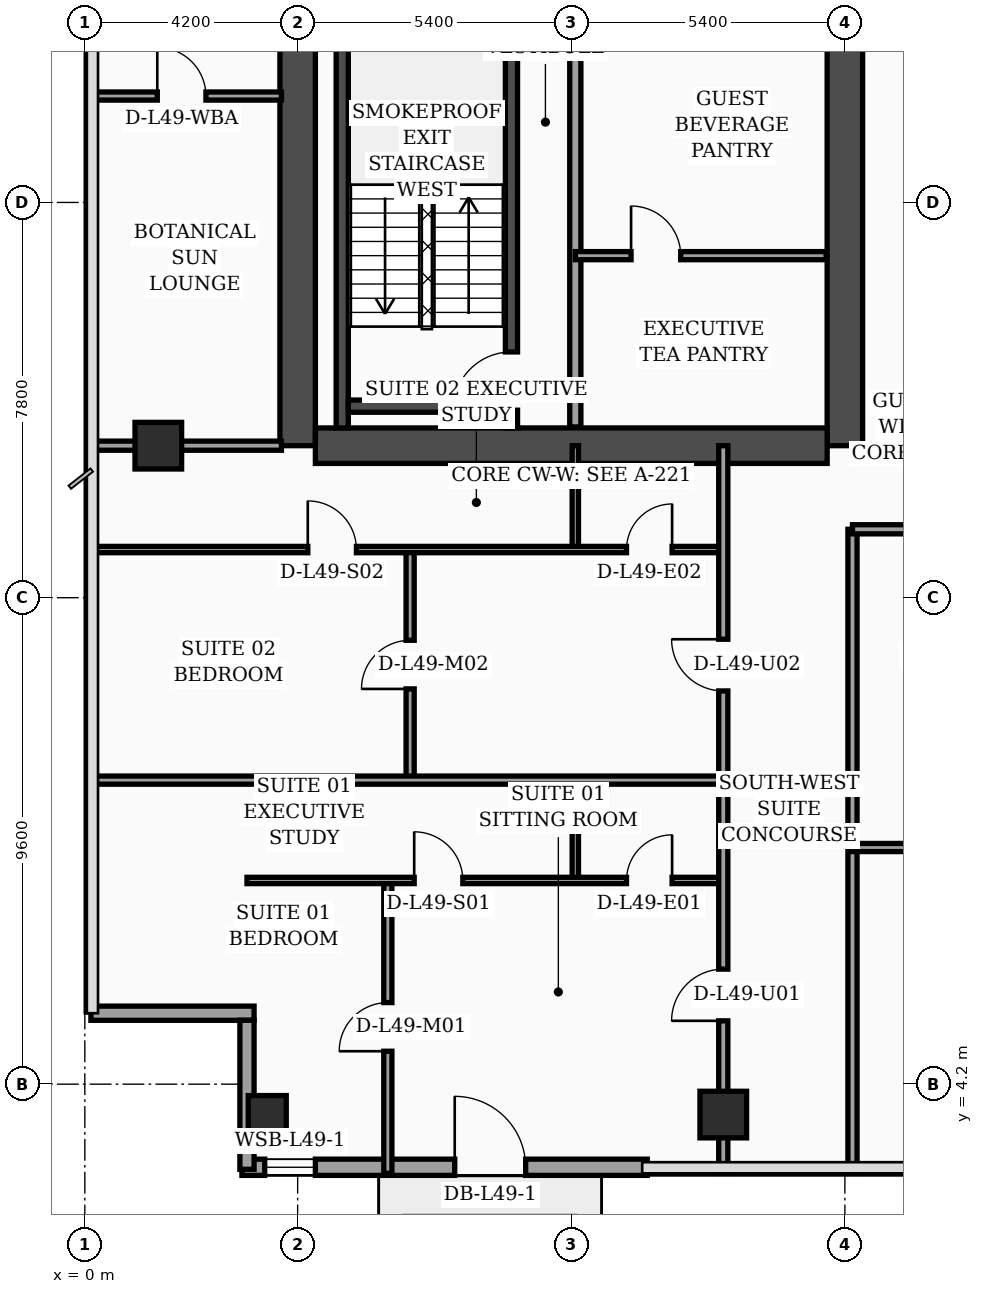
"""IFC4 building model, lengths in metres.
Left out: names, types, materials, properties, quantities, classifications, styles, units other than length and angle.
Written with IfcOpenShell. Run it as: python <this file> out.ifc"""

import sys

from ifc_helpers import new_model, si_unit, direction, frame, frame_2d, origin, origin_2d, place, context, subcontext, project, spatial, rectangle, hollow_rectangle, extrude, element, fill, save


model = new_model("IFC4")
c1 = context("Model", 3, precision=1e-05, world=origin(), true_north=direction((0.0, 1.0)))
c2 = subcontext(c1, "Body", "Model", "MODEL_VIEW")
j1 = project(units=[si_unit("LENGTHUNIT", "METRE"), si_unit("PLANEANGLEUNIT", "RADIAN")], contexts=[c1])
p1 = place(None, origin())
s1 = spatial("IfcSite", under=j1, at=p1, CompositionType="ELEMENT")
p2 = place(p1, origin())
s2 = spatial("IfcBuilding", under=s1, at=p2, CompositionType="ELEMENT")
p3 = place(p2, frame((0.0, 0.0, 199.6)))
s3 = spatial("IfcBuildingStorey", under=s2, at=p3, CompositionType="ELEMENT", Elevation=199.6)
p4 = place(p3, frame((4.2, 16.8, 0.0), z_axis=(0.0, 0.0, 1.0), x_axis=(0.0, 1.0, 0.0)))
e1 = element("IfcWall", 1, at=p4, inside=s3, PredefinedType="SHEAR", context=c2, shape_type="SweptSolid", body=[
    extrude(rectangle(XDim=21.6, YDim=0.7, at=frame_2d((10.8, 0.0))), origin(), (0.0, 0.0, 1.0), 3.56),
])
p5 = place(p3, frame((15.0, 16.8, 0.0), z_axis=(0.0, 0.0, 1.0), x_axis=(0.0, 1.0, 0.0)))
e2 = element("IfcWall", 2, at=p5, inside=s3, PredefinedType="SHEAR", context=c2, shape_type="SweptSolid", body=[
    extrude(rectangle(XDim=21.6, YDim=0.7, at=frame_2d((10.8, 0.0))), origin(), (0.0, 0.0, 1.0), 3.56),
])
p6 = place(p5, frame((8.65, 0.0, 0.0)))
e3 = element("IfcOpeningElement", 3, at=p6, cuts=e2, PredefinedType="OPENING", context=c2, shape_type="SweptSolid", body=[
    extrude(rectangle(XDim=1.1, YDim=2.2, at=frame_2d((0.55, 1.1))), frame((0.0, 0.36, 0.0), z_axis=(0.0, -1.0, 0.0), x_axis=(1.0, 0.0, 0.0)), (0.0, 0.0, 1.0), 0.72),
])
p7 = place(p5, frame((10.85, 0.0, 0.0)))
e4 = element("IfcOpeningElement", 4, at=p7, cuts=e2, PredefinedType="OPENING", context=c2, shape_type="SweptSolid", body=[
    extrude(rectangle(XDim=1.1, YDim=2.2, at=frame_2d((0.55, 1.1))), frame((0.0, 0.36, 0.0), z_axis=(0.0, -1.0, 0.0), x_axis=(1.0, 0.0, 0.0)), (0.0, 0.0, 1.0), 0.72),
])
p8 = place(p5, frame((13.5, 0.0, 0.0)))
e5 = element("IfcOpeningElement", 5, at=p8, cuts=e2, PredefinedType="OPENING", context=c2, shape_type="SweptSolid", body=[
    extrude(rectangle(XDim=1.1, YDim=2.2, at=frame_2d((0.55, 1.1))), frame((0.0, 0.36, 0.0), z_axis=(0.0, -1.0, 0.0), x_axis=(1.0, 0.0, 0.0)), (0.0, 0.0, 1.0), 0.72),
])
p9 = place(p5, frame((16.15, 0.0, 0.0)))
e6 = element("IfcOpeningElement", 6, at=p9, cuts=e2, PredefinedType="OPENING", context=c2, shape_type="SweptSolid", body=[
    extrude(rectangle(XDim=1.1, YDim=2.2, at=frame_2d((0.55, 1.1))), frame((0.0, 0.36, 0.0), z_axis=(0.0, -1.0, 0.0), x_axis=(1.0, 0.0, 0.0)), (0.0, 0.0, 1.0), 0.72),
])
p10 = place(p3, frame((4.55, 16.8, 0.0), z_axis=(0.0, 0.0, 1.0), x_axis=(1.0, 0.0, 0.0)))
e7 = element("IfcWall", 7, at=p10, inside=s3, PredefinedType="SHEAR", context=c2, shape_type="SweptSolid", body=[
    extrude(rectangle(XDim=10.1, YDim=0.7, at=frame_2d((5.05, 0.0))), origin(), (0.0, 0.0, 1.0), 3.56),
])
p11 = place(p3, frame((5.08, 17.15, 0.0), z_axis=(0.0, 0.0, 1.0), x_axis=(0.0, 1.0, 0.0)))
e8 = element("IfcWall", 8, at=p11, inside=s3, PredefinedType="SOLIDWALL", context=c2, shape_type="SweptSolid", body=[
    extrude(rectangle(XDim=9.64, YDim=0.24, at=frame_2d((4.82, 0.0))), origin(), (0.0, 0.0, 1.0), 3.56),
])
p12 = place(p3, frame((8.42, 17.15, 0.0), z_axis=(0.0, 0.0, 1.0), x_axis=(0.0, 1.0, 0.0)))
e9 = element("IfcWall", 9, at=p12, inside=s3, PredefinedType="SOLIDWALL", context=c2, shape_type="SweptSolid", body=[
    extrude(rectangle(XDim=9.64, YDim=0.24, at=frame_2d((4.82, 0.0))), origin(), (0.0, 0.0, 1.0), 3.56),
])
p13 = place(p12, frame((0.35, 0.0, 0.0)))
e10 = element("IfcOpeningElement", 10, at=p13, cuts=e9, PredefinedType="OPENING", context=c2, shape_type="SweptSolid", body=[
    extrude(rectangle(XDim=1.15, YDim=2.2, at=frame_2d((0.575, 1.1))), frame((0.0, 0.13, 0.0), z_axis=(0.0, -1.0, 0.0), x_axis=(1.0, 0.0, 0.0)), (0.0, 0.0, 1.0), 0.26),
])
p14 = place(p3, frame((5.2, 17.58, 0.0), z_axis=(0.0, 0.0, 1.0), x_axis=(1.0, 0.0, 0.0)))
e11 = element("IfcWall", 11, at=p14, inside=s3, PredefinedType="SOLIDWALL", context=c2, shape_type="SweptSolid", body=[
    extrude(rectangle(XDim=3.1, YDim=0.24, at=frame_2d((1.55, 0.0))), origin(), (0.0, 0.0, 1.0), 3.56),
])
p15 = place(p3, frame((3.6, 3.6, 0.0), z_axis=(0.0, 0.0, 1.0), x_axis=(1.0, 0.0, 0.0)))
e12 = element("IfcColumn", 12, at=p15, inside=s3, PredefinedType="COLUMN", context=c2, shape_type="SweptSolid", body=[
    extrude(hollow_rectangle(XDim=0.75, YDim=0.75, WallThickness=0.032, at=origin_2d()), origin(), (0.0, 0.0, 1.0), 3.56),
])
for number, where, z_axis, x_axis in (
    (13, (1.45, 16.8, 0.0), (0.0, 0.0, 1.0), (1.0, 0.0, 0.0)),
    (14, (12.6, 3.6, 0.0), (0.0, 0.0, 1.0), (1.0, 0.0, 0.0)),
):
    element("IfcColumn", number, at=place(p3, frame(where, z_axis=z_axis, x_axis=x_axis)), inside=s3, PredefinedType="COLUMN", context=c2, shape_type="SweptSolid", body=[
        extrude(rectangle(XDim=0.92, YDim=0.92, at=origin_2d()), origin(), (0.0, 0.0, 1.0), 3.56),
    ])
p16 = place(p3, frame((3.1, 2.56, 0.0), z_axis=(0.0, 0.0, 1.0), x_axis=(1.0, 0.0, 0.0)))
e15 = element("IfcWall", 15, at=p16, inside=s3, PredefinedType="SOLIDWALL", context=c2, shape_type="SweptSolid", body=[
    extrude(rectangle(XDim=8.0, YDim=0.32, at=frame_2d((4.0, 0.0))), origin(), (0.0, 0.0, 1.0), 3.56),
])
p17 = place(p16, frame((0.45, 0.0, 0.75)))
e16 = element("IfcOpeningElement", 16, at=p17, cuts=e15, PredefinedType="OPENING", context=c2, shape_type="SweptSolid", body=[
    extrude(rectangle(XDim=1.0, YDim=1.6, at=frame_2d((0.5, 0.8))), frame((0.0, 0.17, 0.0), z_axis=(0.0, -1.0, 0.0), x_axis=(1.0, 0.0, 0.0)), (0.0, 0.0, 1.0), 0.34),
])
p18 = place(p16, frame((4.2, 0.0, 0.0)))
e17 = element("IfcOpeningElement", 17, at=p18, cuts=e15, PredefinedType="OPENING", context=c2, shape_type="SweptSolid", body=[
    extrude(rectangle(XDim=1.4, YDim=2.25, at=frame_2d((0.7, 1.125))), frame((0.0, 0.17, 0.0), z_axis=(0.0, -1.0, 0.0), x_axis=(1.0, 0.0, 0.0)), (0.0, 0.0, 1.0), 0.34),
])
p19 = place(p3, frame((0.12, 5.6, 0.0), z_axis=(0.0, 0.0, 1.0), x_axis=(1.0, 0.0, 0.0)))
e18 = element("IfcWall", 18, at=p19, inside=s3, PredefinedType="SOLIDWALL", context=c2, shape_type="SweptSolid", body=[
    extrude(rectangle(XDim=3.22, YDim=0.28, at=frame_2d((1.61, 0.0))), origin(), (0.0, 0.0, 1.0), 2.94),
])
p20 = place(p3, frame((3.2, 5.46, 0.0), z_axis=(0.0, 0.0, 1.0), x_axis=(0.0, -1.0, 0.0)))
e19 = element("IfcWall", 19, at=p20, inside=s3, PredefinedType="SOLIDWALL", context=c2, shape_type="SweptSolid", body=[
    extrude(rectangle(XDim=2.94, YDim=0.28, at=frame_2d((1.47, 0.0))), origin(), (0.0, 0.0, 1.0), 2.94),
])
p21 = place(p3, frame((9.68, 17.17, 0.0), z_axis=(0.0, 0.0, 1.0), x_axis=(0.0, 1.0, 0.0)))
e20 = element("IfcWall", 20, at=p21, inside=s3, PredefinedType="SOLIDWALL", context=c2, shape_type="SweptSolid", body=[
    extrude(rectangle(XDim=7.83, YDim=0.22, at=frame_2d((3.915, 0.0))), origin(), (0.0, 0.0, 1.0), 3.56),
])
p22 = place(p3, frame((9.68, 20.55, 0.0), z_axis=(0.0, 0.0, 1.0), x_axis=(1.0, 0.0, 0.0)))
e21 = element("IfcWall", 21, at=p22, inside=s3, PredefinedType="PARTITIONING", context=c2, shape_type="SweptSolid", body=[
    extrude(rectangle(XDim=4.95, YDim=0.16, at=frame_2d((2.475, 0.0))), origin(), (0.0, 0.0, 1.0), 3.56),
])
p23 = place(p22, frame((1.1, 0.0, 0.0)))
e22 = element("IfcOpeningElement", 22, at=p23, cuts=e21, PredefinedType="OPENING", context=c2, shape_type="SweptSolid", body=[
    extrude(rectangle(XDim=0.98, YDim=2.15, at=frame_2d((0.49, 1.075))), frame((0.0, 0.09, 0.0), z_axis=(0.0, -1.0, 0.0), x_axis=(1.0, 0.0, 0.0)), (0.0, 0.0, 1.0), 0.18),
])
p24 = place(p3, frame((0.08, 23.7, 0.0), z_axis=(0.0, 0.0, 1.0), x_axis=(1.0, 0.0, 0.0)))
e23 = element("IfcWall", 23, at=p24, inside=s3, PredefinedType="PARTITIONING", context=c2, shape_type="SweptSolid", body=[
    extrude(rectangle(XDim=3.8, YDim=0.16, at=frame_2d((1.9, 0.0))), origin(), (0.0, 0.0, 1.0), 3.09),
])
p25 = place(p24, frame((1.35, 0.0, 0.0)))
e24 = element("IfcOpeningElement", 24, at=p25, cuts=e23, PredefinedType="OPENING", context=c2, shape_type="SweptSolid", body=[
    extrude(rectangle(XDim=0.96, YDim=2.2, at=frame_2d((0.48, 1.1))), frame((0.0, 0.09, 0.0), z_axis=(0.0, -1.0, 0.0), x_axis=(1.0, 0.0, 0.0)), (0.0, 0.0, 1.0), 0.18),
])
p26 = place(p3, frame((0.08, 16.8, 0.0), z_axis=(0.0, 0.0, 1.0), x_axis=(1.0, 0.0, 0.0)))
e25 = element("IfcWall", 25, at=p26, inside=s3, PredefinedType="PARTITIONING", context=c2, shape_type="SweptSolid", body=[
    extrude(rectangle(XDim=3.8, YDim=0.18, at=frame_2d((1.9, 0.0))), origin(), (0.0, 0.0, 1.0), 2.94),
])
p27 = place(p3, frame((9.68, 8.22, 0.0), z_axis=(0.0, 0.0, 1.0), x_axis=(0.0, 1.0, 0.0)))
e26 = element("IfcWall", 26, at=p27, inside=s3, PredefinedType="PARTITIONING", context=c2, shape_type="SweptSolid", body=[
    extrude(rectangle(XDim=1.98, YDim=0.125, at=frame_2d((0.99, 0.0))), origin(), (0.0, 0.0, 1.0), 3.09),
])
p28 = place(p3, frame((5.98, 2.44, 0.0), z_axis=(0.0, 0.0, 1.0), x_axis=(0.0, 1.0, 0.0)))
e27 = element("IfcWall", 27, at=p28, inside=s3, PredefinedType="PARTITIONING", context=c2, shape_type="SweptSolid", body=[
    extrude(rectangle(XDim=5.78, YDim=0.16, at=frame_2d((2.89, 0.0))), origin(), (0.0, 0.0, 1.0), 3.09),
])
p29 = place(p28, frame((2.41, 0.0, 0.0)))
e28 = element("IfcOpeningElement", 28, at=p29, cuts=e27, PredefinedType="OPENING", context=c2, shape_type="SweptSolid", body=[
    extrude(rectangle(XDim=0.96, YDim=2.2, at=frame_2d((0.48, 1.1))), frame((0.0, 0.09, 0.0), z_axis=(0.0, -1.0, 0.0), x_axis=(1.0, 0.0, 0.0)), (0.0, 0.0, 1.0), 0.18),
])
p30 = place(p3, frame((3.2, 8.22, 0.0), z_axis=(0.0, 0.0, 1.0), x_axis=(1.0, 0.0, 0.0)))
e29 = element("IfcWall", 29, at=p30, inside=s3, PredefinedType="PARTITIONING", context=c2, shape_type="SweptSolid", body=[
    extrude(rectangle(XDim=9.4, YDim=0.125, at=frame_2d((4.7, 0.0))), origin(), (0.0, 0.0, 1.0), 2.94),
])
p31 = place(p30, frame((3.3, 0.0, 0.0)))
e30 = element("IfcOpeningElement", 30, at=p31, cuts=e29, PredefinedType="OPENING", context=c2, shape_type="SweptSolid", body=[
    extrude(rectangle(XDim=0.96, YDim=2.2, at=frame_2d((0.48, 1.1))), frame((0.0, 0.073, 0.0), z_axis=(0.0, -1.0, 0.0), x_axis=(1.0, 0.0, 0.0)), (0.0, 0.0, 1.0), 0.145),
])
p32 = place(p30, frame((7.49, 0.0, 0.0)))
e31 = element("IfcOpeningElement", 31, at=p32, cuts=e29, PredefinedType="OPENING", context=c2, shape_type="SweptSolid", body=[
    extrude(rectangle(XDim=0.9, YDim=2.15, at=frame_2d((0.45, 1.075))), frame((0.0, 0.073, 0.0), z_axis=(0.0, -1.0, 0.0), x_axis=(1.0, 0.0, 0.0)), (0.0, 0.0, 1.0), 0.145),
])
p33 = place(p3, frame((9.68, 14.75, 0.0), z_axis=(0.0, 0.0, 1.0), x_axis=(0.0, 1.0, 0.0)))
e32 = element("IfcWall", 32, at=p33, inside=s3, PredefinedType="PARTITIONING", context=c2, shape_type="SweptSolid", body=[
    extrude(rectangle(XDim=2.05, YDim=0.125, at=frame_2d((1.025, 0.0))), origin(), (0.0, 0.0, 1.0), 3.56),
])
p34 = place(p3, frame((6.42, 10.2, 0.0), z_axis=(0.0, 0.0, 1.0), x_axis=(0.0, 1.0, 0.0)))
e33 = element("IfcWall", 33, at=p34, inside=s3, PredefinedType="PARTITIONING", context=c2, shape_type="SweptSolid", body=[
    extrude(rectangle(XDim=4.55, YDim=0.16, at=frame_2d((2.275, 0.0))), origin(), (0.0, 0.0, 1.0), 3.14),
])
p35 = place(p34, frame((1.8, 0.0, 0.0)))
e34 = element("IfcOpeningElement", 34, at=p35, cuts=e33, PredefinedType="OPENING", context=c2, shape_type="SweptSolid", body=[
    extrude(rectangle(XDim=0.96, YDim=2.2, at=frame_2d((0.48, 1.1))), frame((0.0, 0.09, 0.0), z_axis=(0.0, -1.0, 0.0), x_axis=(1.0, 0.0, 0.0)), (0.0, 0.0, 1.0), 0.18),
])
p36 = place(p3, frame((0.08, 14.75, 0.0), z_axis=(0.0, 0.0, 1.0), x_axis=(1.0, 0.0, 0.0)))
e35 = element("IfcWall", 35, at=p36, inside=s3, PredefinedType="PARTITIONING", context=c2, shape_type="SweptSolid", body=[
    extrude(rectangle(XDim=12.52, YDim=0.125, at=frame_2d((6.26, 0.0))), origin(), (0.0, 0.0, 1.0), 2.94),
])
p37 = place(p36, frame((4.32, 0.0, 0.0)))
e36 = element("IfcOpeningElement", 36, at=p37, cuts=e35, PredefinedType="OPENING", context=c2, shape_type="SweptSolid", body=[
    extrude(rectangle(XDim=0.96, YDim=2.2, at=frame_2d((0.48, 1.1))), frame((0.0, 0.073, 0.0), z_axis=(0.0, -1.0, 0.0), x_axis=(1.0, 0.0, 0.0)), (0.0, 0.0, 1.0), 0.145),
])
p38 = place(p36, frame((10.61, 0.0, 0.0)))
e37 = element("IfcOpeningElement", 37, at=p38, cuts=e35, PredefinedType="OPENING", context=c2, shape_type="SweptSolid", body=[
    extrude(rectangle(XDim=0.9, YDim=2.15, at=frame_2d((0.45, 1.075))), frame((0.0, 0.073, 0.0), z_axis=(0.0, -1.0, 0.0), x_axis=(1.0, 0.0, 0.0)), (0.0, 0.0, 1.0), 0.145),
])
p39 = place(p3, frame((0.08, 10.2, 0.0), z_axis=(0.0, 0.0, 1.0), x_axis=(1.0, 0.0, 0.0)))
e38 = element("IfcWall", 38, at=p39, inside=s3, PredefinedType="PARTITIONING", context=c2, shape_type="SweptSolid", body=[
    extrude(rectangle(XDim=12.52, YDim=0.16, at=frame_2d((6.26, 0.0))), origin(), (0.0, 0.0, 1.0), 2.94),
])
p40 = place(p3, frame((12.6, 2.44, 0.0), z_axis=(0.0, 0.0, 1.0), x_axis=(0.0, 1.0, 0.0)))
e39 = element("IfcWall", 39, at=p40, inside=s3, PredefinedType="PARTITIONING", context=c2, shape_type="SweptSolid", body=[
    extrude(rectangle(XDim=14.36, YDim=0.18, at=frame_2d((7.18, 0.0))), origin(), (0.0, 0.0, 1.0), 2.94),
])
p41 = place(p40, frame((3.01, 0.0, 0.0)))
e40 = element("IfcOpeningElement", 40, at=p41, cuts=e39, PredefinedType="OPENING", context=c2, shape_type="SweptSolid", body=[
    extrude(rectangle(XDim=1.02, YDim=2.2, at=frame_2d((0.51, 1.1))), frame((0.0, 0.1, 0.0), z_axis=(0.0, -1.0, 0.0), x_axis=(1.0, 0.0, 0.0)), (0.0, 0.0, 1.0), 0.2),
])
p42 = place(p40, frame((9.52, 0.0, 0.0)))
e41 = element("IfcOpeningElement", 41, at=p42, cuts=e39, PredefinedType="OPENING", context=c2, shape_type="SweptSolid", body=[
    extrude(rectangle(XDim=1.02, YDim=2.2, at=frame_2d((0.51, 1.1))), frame((0.0, 0.1, 0.0), z_axis=(0.0, -1.0, 0.0), x_axis=(1.0, 0.0, 0.0)), (0.0, 0.0, 1.0), 0.2),
])
p43 = place(p3, frame((15.15, 2.44, 0.0), z_axis=(0.0, 0.0, 1.0), x_axis=(0.0, 1.0, 0.0)))
e42 = element("IfcWall", 42, at=p43, inside=s3, PredefinedType="PARTITIONING", context=c2, shape_type="SweptSolid", body=[
    extrude(rectangle(XDim=12.71, YDim=0.18, at=frame_2d((6.355, 0.0))), origin(), (0.0, 0.0, 1.0), 3.09),
])
p44 = place(p3, frame((15.15, 8.87, 0.0), z_axis=(0.0, 0.0, 1.0), x_axis=(1.0, 0.0, 0.0)))
e43 = element("IfcWall", 43, at=p44, inside=s3, PredefinedType="PARTITIONING", context=c2, shape_type="SweptSolid", body=[
    extrude(rectangle(XDim=4.45, YDim=0.16, at=frame_2d((2.225, 0.0))), origin(), (0.0, 0.0, 1.0), 3.56),
])
p45 = place(p44, frame((1.75, 0.0, 0.0)))
e44 = element("IfcOpeningElement", 44, at=p45, cuts=e43, PredefinedType="OPENING", context=c2, shape_type="SweptSolid", body=[
    extrude(rectangle(XDim=0.96, YDim=2.2, at=frame_2d((0.48, 1.1))), frame((0.0, 0.09, 0.0), z_axis=(0.0, -1.0, 0.0), x_axis=(1.0, 0.0, 0.0)), (0.0, 0.0, 1.0), 0.18),
])
p46 = place(p3, frame((15.15, 15.15, 0.0), z_axis=(0.0, 0.0, 1.0), x_axis=(1.0, 0.0, 0.0)))
e45 = element("IfcWall", 45, at=p46, inside=s3, PredefinedType="PARTITIONING", context=c2, shape_type="SweptSolid", body=[
    extrude(rectangle(XDim=6.45, YDim=0.18, at=frame_2d((3.225, 0.0))), origin(), (0.0, 0.0, 1.0), 2.59),
])
p47 = place(p46, frame((1.74, 0.0, 0.0)))
e46 = element("IfcOpeningElement", 46, at=p47, cuts=e45, PredefinedType="OPENING", context=c2, shape_type="SweptSolid", body=[
    extrude(rectangle(XDim=1.02, YDim=2.2, at=frame_2d((0.51, 1.1))), frame((0.0, 0.1, 0.0), z_axis=(0.0, -1.0, 0.0), x_axis=(1.0, 0.0, 0.0)), (0.0, 0.0, 1.0), 0.2),
])
p48 = place(p17, origin())
e47 = element("IfcWindow", 47, at=p48, inside=s3, PartitioningType="SINGLE_PANEL", PredefinedType="WINDOW", context=c2, shape_type="SweptSolid", body=[
    extrude(rectangle(XDim=1.0, YDim=1.6, at=frame_2d((0.5, 0.8))), frame((0.0, 0.03, 0.0), z_axis=(0.0, -1.0, 0.0), x_axis=(1.0, 0.0, 0.0)), (0.0, 0.0, 1.0), 0.06),
])
fill(e16, e47)
p49 = place(p18, origin())
e48 = element("IfcDoor", 48, at=p49, inside=s3, OperationType="SINGLE_SWING_LEFT", PredefinedType="DOOR", context=c2, shape_type="SweptSolid", body=[
    extrude(rectangle(XDim=1.4, YDim=2.25, at=frame_2d((0.7, 1.125))), frame((0.0, 0.025, 0.0), z_axis=(0.0, -1.0, 0.0), x_axis=(1.0, 0.0, 0.0)), (0.0, 0.0, 1.0), 0.05),
])
fill(e17, e48)
p50 = place(p23, origin())
e49 = element("IfcDoor", 49, at=p50, inside=s3, OperationType="SINGLE_SWING_LEFT", PredefinedType="DOOR", context=c2, shape_type="SweptSolid", body=[
    extrude(rectangle(XDim=0.98, YDim=2.15, at=frame_2d((0.49, 1.075))), frame((0.0, 0.025, 0.0), z_axis=(0.0, -1.0, 0.0), x_axis=(1.0, 0.0, 0.0)), (0.0, 0.0, 1.0), 0.05),
])
fill(e22, e49)
p51 = place(p25, origin())
e50 = element("IfcDoor", 50, at=p51, inside=s3, OperationType="SINGLE_SWING_LEFT", PredefinedType="DOOR", context=c2, shape_type="SweptSolid", body=[
    extrude(rectangle(XDim=0.96, YDim=2.2, at=frame_2d((0.48, 1.1))), frame((0.0, 0.025, 0.0), z_axis=(0.0, -1.0, 0.0), x_axis=(1.0, 0.0, 0.0)), (0.0, 0.0, 1.0), 0.05),
])
fill(e24, e50)
p52 = place(p29, origin())
e51 = element("IfcDoor", 51, at=p52, inside=s3, OperationType="SINGLE_SWING_LEFT", PredefinedType="DOOR", context=c2, shape_type="SweptSolid", body=[
    extrude(rectangle(XDim=0.96, YDim=2.2, at=frame_2d((0.48, 1.1))), frame((0.0, 0.025, 0.0), z_axis=(0.0, -1.0, 0.0), x_axis=(1.0, 0.0, 0.0)), (0.0, 0.0, 1.0), 0.05),
])
fill(e28, e51)
p53 = place(p31, origin())
e52 = element("IfcDoor", 52, at=p53, inside=s3, OperationType="SINGLE_SWING_LEFT", PredefinedType="DOOR", context=c2, shape_type="SweptSolid", body=[
    extrude(rectangle(XDim=0.96, YDim=2.2, at=frame_2d((0.48, 1.1))), frame((0.0, 0.025, 0.0), z_axis=(0.0, -1.0, 0.0), x_axis=(1.0, 0.0, 0.0)), (0.0, 0.0, 1.0), 0.05),
])
fill(e30, e52)
p54 = place(p32, origin())
e53 = element("IfcDoor", 53, at=p54, inside=s3, OperationType="SINGLE_SWING_RIGHT", PredefinedType="DOOR", context=c2, shape_type="SweptSolid", body=[
    extrude(rectangle(XDim=0.9, YDim=2.15, at=frame_2d((0.45, 1.075))), frame((0.0, 0.025, 0.0), z_axis=(0.0, -1.0, 0.0), x_axis=(1.0, 0.0, 0.0)), (0.0, 0.0, 1.0), 0.05),
])
fill(e31, e53)
p55 = place(p35, origin())
e54 = element("IfcDoor", 54, at=p55, inside=s3, OperationType="SINGLE_SWING_LEFT", PredefinedType="DOOR", context=c2, shape_type="SweptSolid", body=[
    extrude(rectangle(XDim=0.96, YDim=2.2, at=frame_2d((0.48, 1.1))), frame((0.0, 0.025, 0.0), z_axis=(0.0, -1.0, 0.0), x_axis=(1.0, 0.0, 0.0)), (0.0, 0.0, 1.0), 0.05),
])
fill(e34, e54)
p56 = place(p37, origin())
e55 = element("IfcDoor", 55, at=p56, inside=s3, OperationType="SINGLE_SWING_LEFT", PredefinedType="DOOR", context=c2, shape_type="SweptSolid", body=[
    extrude(rectangle(XDim=0.96, YDim=2.2, at=frame_2d((0.48, 1.1))), frame((0.0, 0.025, 0.0), z_axis=(0.0, -1.0, 0.0), x_axis=(1.0, 0.0, 0.0)), (0.0, 0.0, 1.0), 0.05),
])
fill(e36, e55)
p57 = place(p38, origin())
e56 = element("IfcDoor", 56, at=p57, inside=s3, OperationType="SINGLE_SWING_RIGHT", PredefinedType="DOOR", context=c2, shape_type="SweptSolid", body=[
    extrude(rectangle(XDim=0.9, YDim=2.15, at=frame_2d((0.45, 1.075))), frame((0.0, 0.025, 0.0), z_axis=(0.0, -1.0, 0.0), x_axis=(1.0, 0.0, 0.0)), (0.0, 0.0, 1.0), 0.05),
])
fill(e37, e56)
p58 = place(p41, origin())
e57 = element("IfcDoor", 57, at=p58, inside=s3, OperationType="SINGLE_SWING_LEFT", PredefinedType="DOOR", context=c2, shape_type="SweptSolid", body=[
    extrude(rectangle(XDim=1.02, YDim=2.2, at=frame_2d((0.51, 1.1))), frame((0.0, 0.025, 0.0), z_axis=(0.0, -1.0, 0.0), x_axis=(1.0, 0.0, 0.0)), (0.0, 0.0, 1.0), 0.05),
])
fill(e40, e57)
p59 = place(p42, origin())
e58 = element("IfcDoor", 58, at=p59, inside=s3, OperationType="SINGLE_SWING_RIGHT", PredefinedType="DOOR", context=c2, shape_type="SweptSolid", body=[
    extrude(rectangle(XDim=1.02, YDim=2.2, at=frame_2d((0.51, 1.1))), frame((0.0, 0.025, 0.0), z_axis=(0.0, -1.0, 0.0), x_axis=(1.0, 0.0, 0.0)), (0.0, 0.0, 1.0), 0.05),
])
fill(e41, e58)
p60 = place(p13, origin())
e59 = element("IfcDoor", 59, at=p60, inside=s3, OperationType="SINGLE_SWING_LEFT", PredefinedType="DOOR", context=c2, shape_type="SweptSolid", body=[
    extrude(rectangle(XDim=1.15, YDim=2.2, at=frame_2d((0.575, 1.1))), frame((0.0, 0.025, 0.0), z_axis=(0.0, -1.0, 0.0), x_axis=(1.0, 0.0, 0.0)), (0.0, 0.0, 1.0), 0.05),
])
fill(e10, e59)
save(model, sys.argv[1])
